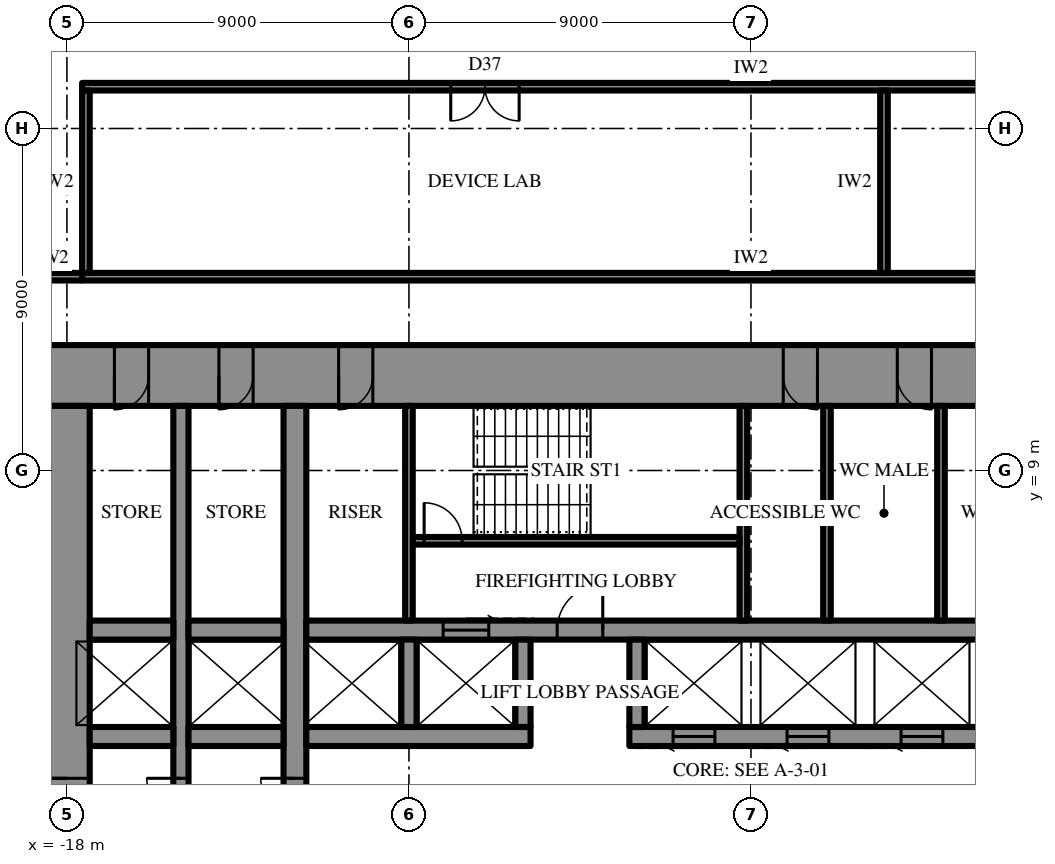
"""IFC4 building model, lengths in metres.
Left out: names, types, materials, properties, quantities, classifications, styles, units other than length and angle.
Written with IfcOpenShell. Run it as: python <this file> out.ifc"""

import sys

from ifc_helpers import new_model, si_unit, direction, frame, frame_2d, origin, place, context, subcontext, project, spatial, rectangle, extrude, element, fill, save


model = new_model("IFC4")
c1 = context("Model", 3, precision=1e-05, world=origin(), true_north=direction((0.0, 1.0)))
c2 = subcontext(c1, "Body", "Model", "MODEL_VIEW")
j1 = project(units=[si_unit("LENGTHUNIT", "METRE"), si_unit("PLANEANGLEUNIT", "RADIAN")], contexts=[c1])
p1 = place(None, origin())
s1 = spatial("IfcSite", under=j1, at=p1, CompositionType="ELEMENT")
p2 = place(p1, origin())
s2 = spatial("IfcBuilding", under=s1, at=p2, CompositionType="ELEMENT")
p3 = place(p2, frame((0.0, 0.0, 40.3)))
s3 = spatial("IfcBuildingStorey", under=s2, at=p3, CompositionType="ELEMENT", Elevation=40.3)
p4 = place(p3, frame((-18.6, 11.5, 0.0), z_axis=(0.0, 0.0, 1.0), x_axis=(1.0, 0.0, 0.0)))
e1 = element("IfcWall", 1, at=p4, inside=s3, PredefinedType="SHEAR", context=c2, shape_type="SweptSolid", body=[
    extrude(rectangle(XDim=37.2, YDim=1.6, at=frame_2d((18.6, 0.0))), origin(), (0.0, 0.0, 1.0), 4.2),
])
p5 = place(p4, frame((19.45, 0.0, 0.0)))
e2 = element("IfcOpeningElement", 2, at=p5, cuts=e1, PredefinedType="OPENING", context=c2, shape_type="SweptSolid", body=[
    extrude(rectangle(XDim=0.9, YDim=2.2, at=frame_2d((0.45, 1.1))), frame((0.0, 0.81, 0.0), z_axis=(0.0, -1.0, 0.0), x_axis=(1.0, 0.0, 0.0)), (0.0, 0.0, 1.0), 1.62),
])
p6 = place(p4, frame((22.45, 0.0, 0.0)))
e3 = element("IfcOpeningElement", 3, at=p6, cuts=e1, PredefinedType="OPENING", context=c2, shape_type="SweptSolid", body=[
    extrude(rectangle(XDim=0.9, YDim=2.2, at=frame_2d((0.45, 1.1))), frame((0.0, 0.81, 0.0), z_axis=(0.0, -1.0, 0.0), x_axis=(1.0, 0.0, 0.0)), (0.0, 0.0, 1.0), 1.62),
])
p7 = place(p4, frame((25.5, 0.0, 0.0)))
e4 = element("IfcOpeningElement", 4, at=p7, cuts=e1, PredefinedType="OPENING", context=c2, shape_type="SweptSolid", body=[
    extrude(rectangle(XDim=1.0, YDim=2.2, at=frame_2d((0.5, 1.1))), frame((0.0, 0.81, 0.0), z_axis=(0.0, -1.0, 0.0), x_axis=(1.0, 0.0, 0.0)), (0.0, 0.0, 1.0), 1.62),
])
p8 = place(p4, frame((1.85, 0.0, 0.0)))
e5 = element("IfcOpeningElement", 5, at=p8, cuts=e1, PredefinedType="OPENING", context=c2, shape_type="SweptSolid", body=[
    extrude(rectangle(XDim=0.9, YDim=2.2, at=frame_2d((0.45, 1.1))), frame((0.0, 0.81, 0.0), z_axis=(0.0, -1.0, 0.0), x_axis=(1.0, 0.0, 0.0)), (0.0, 0.0, 1.0), 1.62),
])
p9 = place(p4, frame((4.6, 0.0, 0.0)))
e6 = element("IfcOpeningElement", 6, at=p9, cuts=e1, PredefinedType="OPENING", context=c2, shape_type="SweptSolid", body=[
    extrude(rectangle(XDim=0.9, YDim=2.2, at=frame_2d((0.45, 1.1))), frame((0.0, 0.81, 0.0), z_axis=(0.0, -1.0, 0.0), x_axis=(1.0, 0.0, 0.0)), (0.0, 0.0, 1.0), 1.62),
])
p10 = place(p4, frame((7.75, 0.0, 0.0)))
e7 = element("IfcOpeningElement", 7, at=p10, cuts=e1, PredefinedType="OPENING", context=c2, shape_type="SweptSolid", body=[
    extrude(rectangle(XDim=0.9, YDim=2.2, at=frame_2d((0.45, 1.1))), frame((0.0, 0.81, 0.0), z_axis=(0.0, -1.0, 0.0), x_axis=(1.0, 0.0, 0.0)), (0.0, 0.0, 1.0), 1.62),
])
p11 = place(p4, frame((28.55, 0.0, 0.0)))
e8 = element("IfcOpeningElement", 8, at=p11, cuts=e1, PredefinedType="OPENING", context=c2, shape_type="SweptSolid", body=[
    extrude(rectangle(XDim=0.9, YDim=2.2, at=frame_2d((0.45, 1.1))), frame((0.0, 0.81, 0.0), z_axis=(0.0, -1.0, 0.0), x_axis=(1.0, 0.0, 0.0)), (0.0, 0.0, 1.0), 1.62),
])
p12 = place(p4, frame((31.7, 0.0, 0.0)))
e9 = element("IfcOpeningElement", 9, at=p12, cuts=e1, PredefinedType="OPENING", context=c2, shape_type="SweptSolid", body=[
    extrude(rectangle(XDim=0.9, YDim=2.2, at=frame_2d((0.45, 1.1))), frame((0.0, 0.81, 0.0), z_axis=(0.0, -1.0, 0.0), x_axis=(1.0, 0.0, 0.0)), (0.0, 0.0, 1.0), 1.62),
])
p13 = place(p4, frame((34.45, 0.0, 0.0)))
e10 = element("IfcOpeningElement", 10, at=p13, cuts=e1, PredefinedType="OPENING", context=c2, shape_type="SweptSolid", body=[
    extrude(rectangle(XDim=0.9, YDim=2.2, at=frame_2d((0.45, 1.1))), frame((0.0, 0.81, 0.0), z_axis=(0.0, -1.0, 0.0), x_axis=(1.0, 0.0, 0.0)), (0.0, 0.0, 1.0), 1.62),
])
p14 = place(p3, frame((-18.0, 10.7, 0.0), z_axis=(0.0, 0.0, 1.0), x_axis=(0.0, -1.0, 0.0)))
e11 = element("IfcWall", 11, at=p14, inside=s3, PredefinedType="SHEAR", context=c2, shape_type="SweptSolid", body=[
    extrude(rectangle(XDim=21.4, YDim=1.2, at=frame_2d((10.7, 0.0))), origin(), (0.0, 0.0, 1.0), 4.2),
])
p15 = place(p14, frame((9.8, 0.0, 0.0)))
e12 = element("IfcOpeningElement", 12, at=p15, cuts=e11, PredefinedType="OPENING", context=c2, shape_type="SweptSolid", body=[
    extrude(rectangle(XDim=1.8, YDim=2.4, at=frame_2d((0.9, 1.2))), frame((0.0, 0.61, 0.0), z_axis=(0.0, -1.0, 0.0), x_axis=(1.0, 0.0, 0.0)), (0.0, 0.0, 1.0), 1.22),
])
p16 = place(p3, frame((-12.0, -10.7, 0.0), z_axis=(0.0, 0.0, 1.0), x_axis=(0.0, 1.0, 0.0)))
e13 = element("IfcWall", 13, at=p16, inside=s3, PredefinedType="SHEAR", context=c2, shape_type="SweptSolid", body=[
    extrude(rectangle(XDim=21.4, YDim=0.6, at=frame_2d((10.7, 0.0))), origin(), (0.0, 0.0, 1.0), 4.2),
])
p17 = place(p16, frame((9.8, 0.0, 0.0)))
e14 = element("IfcOpeningElement", 14, at=p17, cuts=e13, PredefinedType="OPENING", context=c2, shape_type="SweptSolid", body=[
    extrude(rectangle(XDim=1.8, YDim=2.4, at=frame_2d((0.9, 1.2))), frame((0.0, 0.31, 0.0), z_axis=(0.0, -1.0, 0.0), x_axis=(1.0, 0.0, 0.0)), (0.0, 0.0, 1.0), 0.62),
])
p18 = place(p3, frame((-15.0, -10.7, 0.0), z_axis=(0.0, 0.0, 1.0), x_axis=(0.0, 1.0, 0.0)))
e15 = element("IfcWall", 15, at=p18, inside=s3, PredefinedType="SHEAR", context=c2, shape_type="SweptSolid", body=[
    extrude(rectangle(XDim=21.4, YDim=0.4, at=frame_2d((10.7, 0.0))), origin(), (0.0, 0.0, 1.0), 4.2),
])
p19 = place(p18, frame((9.8, 0.0, 0.0)))
e16 = element("IfcOpeningElement", 16, at=p19, cuts=e15, PredefinedType="OPENING", context=c2, shape_type="SweptSolid", body=[
    extrude(rectangle(XDim=1.8, YDim=2.4, at=frame_2d((0.9, 1.2))), frame((0.0, 0.21, 0.0), z_axis=(0.0, -1.0, 0.0), x_axis=(1.0, 0.0, 0.0)), (0.0, 0.0, 1.0), 0.42),
])
p20 = place(p3, frame((-17.4, 2.0, 0.0), z_axis=(0.0, 0.0, 1.0), x_axis=(1.0, 0.0, 0.0)))
e17 = element("IfcWall", 17, at=p20, inside=s3, PredefinedType="SHEAR", context=c2, shape_type="SweptSolid", body=[
    extrude(rectangle(XDim=2.2, YDim=0.5, at=frame_2d((1.1, 0.0))), origin(), (0.0, 0.0, 1.0), 4.2),
])
p21 = place(p3, frame((-14.8, 2.0, 0.0), z_axis=(0.0, 0.0, 1.0), x_axis=(1.0, 0.0, 0.0)))
e18 = element("IfcWall", 18, at=p21, inside=s3, PredefinedType="SHEAR", context=c2, shape_type="SweptSolid", body=[
    extrude(rectangle(XDim=2.5, YDim=0.5, at=frame_2d((1.25, 0.0))), origin(), (0.0, 0.0, 1.0), 4.2),
])
p22 = place(p3, frame((-11.7, 2.0, 0.0), z_axis=(0.0, 0.0, 1.0), x_axis=(1.0, 0.0, 0.0)))
e19 = element("IfcWall", 19, at=p22, inside=s3, PredefinedType="SHEAR", context=c2, shape_type="SweptSolid", body=[
    extrude(rectangle(XDim=5.9, YDim=0.5, at=frame_2d((2.95, 0.0))), origin(), (0.0, 0.0, 1.0), 4.2),
])
p23 = place(p3, frame((-3.2, 2.0, 0.0), z_axis=(0.0, 0.0, 1.0), x_axis=(1.0, 0.0, 0.0)))
e20 = element("IfcWall", 20, at=p23, inside=s3, PredefinedType="SHEAR", context=c2, shape_type="SweptSolid", body=[
    extrude(rectangle(XDim=14.9, YDim=0.5, at=frame_2d((7.45, 0.0))), origin(), (0.0, 0.0, 1.0), 4.2),
])
p24 = place(p23, frame((1.15, 0.0, 0.0)))
e21 = element("IfcOpeningElement", 21, at=p24, cuts=e20, PredefinedType="OPENING", context=c2, shape_type="SweptSolid", body=[
    extrude(rectangle(XDim=1.1, YDim=2.2, at=frame_2d((0.55, 1.1))), frame((0.0, 0.26, 0.0), z_axis=(0.0, -1.0, 0.0), x_axis=(1.0, 0.0, 0.0)), (0.0, 0.0, 1.0), 0.52),
])
p25 = place(p23, frame((4.15, 0.0, 0.0)))
e22 = element("IfcOpeningElement", 22, at=p25, cuts=e20, PredefinedType="OPENING", context=c2, shape_type="SweptSolid", body=[
    extrude(rectangle(XDim=1.1, YDim=2.2, at=frame_2d((0.55, 1.1))), frame((0.0, 0.26, 0.0), z_axis=(0.0, -1.0, 0.0), x_axis=(1.0, 0.0, 0.0)), (0.0, 0.0, 1.0), 0.52),
])
p26 = place(p23, frame((7.15, 0.0, 0.0)))
e23 = element("IfcOpeningElement", 23, at=p26, cuts=e20, PredefinedType="OPENING", context=c2, shape_type="SweptSolid", body=[
    extrude(rectangle(XDim=1.1, YDim=2.2, at=frame_2d((0.55, 1.1))), frame((0.0, 0.26, 0.0), z_axis=(0.0, -1.0, 0.0), x_axis=(1.0, 0.0, 0.0)), (0.0, 0.0, 1.0), 0.52),
])
p27 = place(p23, frame((10.15, 0.0, 0.0)))
e24 = element("IfcOpeningElement", 24, at=p27, cuts=e20, PredefinedType="OPENING", context=c2, shape_type="SweptSolid", body=[
    extrude(rectangle(XDim=1.1, YDim=2.2, at=frame_2d((0.55, 1.1))), frame((0.0, 0.26, 0.0), z_axis=(0.0, -1.0, 0.0), x_axis=(1.0, 0.0, 0.0)), (0.0, 0.0, 1.0), 0.52),
])
p28 = place(p3, frame((-17.4, 4.8, 0.0), z_axis=(0.0, 0.0, 1.0), x_axis=(1.0, 0.0, 0.0)))
e25 = element("IfcWall", 25, at=p28, inside=s3, PredefinedType="SHEAR", context=c2, shape_type="SweptSolid", body=[
    extrude(rectangle(XDim=2.2, YDim=0.5, at=frame_2d((1.1, 0.0))), origin(), (0.0, 0.0, 1.0), 4.2),
])
p29 = place(p3, frame((-14.8, 4.8, 0.0), z_axis=(0.0, 0.0, 1.0), x_axis=(1.0, 0.0, 0.0)))
e26 = element("IfcWall", 26, at=p29, inside=s3, PredefinedType="SHEAR", context=c2, shape_type="SweptSolid", body=[
    extrude(rectangle(XDim=2.5, YDim=0.5, at=frame_2d((1.25, 0.0))), origin(), (0.0, 0.0, 1.0), 4.2),
])
p30 = place(p3, frame((-11.7, 4.8, 0.0), z_axis=(0.0, 0.0, 1.0), x_axis=(1.0, 0.0, 0.0)))
e27 = element("IfcWall", 27, at=p30, inside=s3, PredefinedType="SHEAR", context=c2, shape_type="SweptSolid", body=[
    extrude(rectangle(XDim=23.4, YDim=0.5, at=frame_2d((11.7, 0.0))), origin(), (0.0, 0.0, 1.0), 4.2),
])
p31 = place(p30, frame((6.6, 0.0, 0.0)))
e28 = element("IfcOpeningElement", 28, at=p31, cuts=e27, PredefinedType="OPENING", context=c2, shape_type="SweptSolid", body=[
    extrude(rectangle(XDim=1.2, YDim=2.2, at=frame_2d((0.6, 1.1))), frame((0.0, 0.26, 0.0), z_axis=(0.0, -1.0, 0.0), x_axis=(1.0, 0.0, 0.0)), (0.0, 0.0, 1.0), 0.52),
])
p32 = place(p30, frame((3.6, 0.0, 0.0)))
e29 = element("IfcOpeningElement", 29, at=p32, cuts=e27, PredefinedType="OPENING", context=c2, shape_type="SweptSolid", body=[
    extrude(rectangle(XDim=1.2, YDim=2.2, at=frame_2d((0.6, 1.1))), frame((0.0, 0.26, 0.0), z_axis=(0.0, -1.0, 0.0), x_axis=(1.0, 0.0, 0.0)), (0.0, 0.0, 1.0), 0.52),
])
for number, where, z_axis, x_axis in (
    (30, (-9.0, 2.25, 0.0), (0.0, 0.0, 1.0), (0.0, 1.0, 0.0)),
    (31, (-6.0, 2.25, 0.0), (0.0, 0.0, 1.0), (0.0, 1.0, 0.0)),
    (32, (-3.0, 2.25, 0.0), (0.0, 0.0, 1.0), (0.0, 1.0, 0.0)),
):
    element("IfcWall", number, at=place(p3, frame(where, z_axis=z_axis, x_axis=x_axis)), inside=s3, PredefinedType="SHEAR", context=c2, shape_type="SweptSolid", body=[
        extrude(rectangle(XDim=2.3, YDim=0.4, at=frame_2d((1.15, 0.0))), origin(), (0.0, 0.0, 1.0), 4.2),
    ])
p33 = place(p3, frame((-0.2, 5.05, 0.0), z_axis=(0.0, 0.0, 1.0), x_axis=(0.0, 1.0, 0.0)))
e33 = element("IfcWall", 33, at=p33, inside=s3, PredefinedType="SHEAR", context=c2, shape_type="SweptSolid", body=[
    extrude(rectangle(XDim=5.65, YDim=0.2, at=frame_2d((2.825, 0.0))), origin(), (0.0, 0.0, 1.0), 4.2),
])
p34 = place(p3, frame((-8.9, 7.15, 0.0), z_axis=(0.0, 0.0, 1.0), x_axis=(1.0, 0.0, 0.0)))
e34 = element("IfcWall", 34, at=p34, inside=s3, PredefinedType="SHEAR", context=c2, shape_type="SweptSolid", body=[
    extrude(rectangle(XDim=8.6, YDim=0.2, at=frame_2d((4.3, 0.0))), origin(), (0.0, 0.0, 1.0), 4.2),
])
p35 = place(p34, frame((0.3, 0.0, 0.0)))
e35 = element("IfcOpeningElement", 35, at=p35, cuts=e34, PredefinedType="OPENING", context=c2, shape_type="SweptSolid", body=[
    extrude(rectangle(XDim=1.0, YDim=2.2, at=frame_2d((0.5, 1.1))), frame((0.0, 0.11, 0.0), z_axis=(0.0, -1.0, 0.0), x_axis=(1.0, 0.0, 0.0)), (0.0, 0.0, 1.0), 0.22),
])
for number, where, z_axis, x_axis in (
    (36, (-9.0, 5.05, 0.0), (0.0, 0.0, 1.0), (0.0, 1.0, 0.0)),
    (37, (2.0, 5.05, 0.0), (0.0, 0.0, 1.0), (0.0, 1.0, 0.0)),
    (38, (5.0, 5.05, 0.0), (0.0, 0.0, 1.0), (0.0, 1.0, 0.0)),
):
    element("IfcWall", number, at=place(p3, frame(where, z_axis=z_axis, x_axis=x_axis)), inside=s3, PredefinedType="PARTITIONING", context=c2, shape_type="SweptSolid", body=[
        extrude(rectangle(XDim=5.65, YDim=0.2, at=frame_2d((2.825, 0.0))), origin(), (0.0, 0.0, 1.0), 4.0),
    ])
p36 = place(p3, frame((-17.6, 14.1, 0.0), z_axis=(0.0, 0.0, 1.0), x_axis=(1.0, 0.0, 0.0)))
e39 = element("IfcWall", 39, at=p36, inside=s3, PredefinedType="PARTITIONING", context=c2, shape_type="SweptSolid", body=[
    extrude(rectangle(XDim=35.2, YDim=0.2, at=frame_2d((17.6, 0.0))), origin(), (0.0, 0.0, 1.0), 4.0),
])
p37 = place(p3, frame((-17.6, 19.1, 0.0), z_axis=(0.0, 0.0, 1.0), x_axis=(1.0, 0.0, 0.0)))
e40 = element("IfcWall", 40, at=p37, inside=s3, PredefinedType="PARTITIONING", context=c2, shape_type="SweptSolid", body=[
    extrude(rectangle(XDim=35.2, YDim=0.2, at=frame_2d((17.6, 0.0))), origin(), (0.0, 0.0, 1.0), 4.0),
])
p38 = place(p37, frame((9.7, 0.0, 0.0)))
e41 = element("IfcOpeningElement", 41, at=p38, cuts=e40, PredefinedType="OPENING", context=c2, shape_type="SweptSolid", body=[
    extrude(rectangle(XDim=1.8, YDim=2.4, at=frame_2d((0.9, 1.2))), frame((0.0, 0.11, 0.0), z_axis=(0.0, -1.0, 0.0), x_axis=(1.0, 0.0, 0.0)), (0.0, 0.0, 1.0), 0.22),
])
p39 = place(p37, frame((27.2, 0.0, 0.0)))
e42 = element("IfcOpeningElement", 42, at=p39, cuts=e40, PredefinedType="OPENING", context=c2, shape_type="SweptSolid", body=[
    extrude(rectangle(XDim=1.8, YDim=2.4, at=frame_2d((0.9, 1.2))), frame((0.0, 0.11, 0.0), z_axis=(0.0, -1.0, 0.0), x_axis=(1.0, 0.0, 0.0)), (0.0, 0.0, 1.0), 0.22),
])
for number, where, z_axis, x_axis in (
    (43, (-17.5, 14.2, 0.0), (0.0, 0.0, 1.0), (0.0, 1.0, 0.0)),
    (44, (3.5, 14.2, 0.0), (0.0, 0.0, 1.0), (0.0, 1.0, 0.0)),
):
    element("IfcWall", number, at=place(p3, frame(where, z_axis=z_axis, x_axis=x_axis)), inside=s3, PredefinedType="PARTITIONING", context=c2, shape_type="SweptSolid", body=[
        extrude(rectangle(XDim=4.8, YDim=0.2, at=frame_2d((2.4, 0.0))), origin(), (0.0, 0.0, 1.0), 4.0),
    ])
p40 = place(p3, frame((-19.2, 14.1, 0.0), z_axis=(0.0, 0.0, 1.0), x_axis=(1.0, 0.0, 0.0)))
e45 = element("IfcWall", 45, at=p40, inside=s3, PredefinedType="PARTITIONING", context=c2, shape_type="SweptSolid", body=[
    extrude(rectangle(XDim=1.6, YDim=0.2, at=frame_2d((0.8, 0.0))), origin(), (0.0, 0.0, 1.0), 4.0),
])
p41 = place(p15, frame((1.8, 0.0, 0.0), z_axis=(0.0, 0.0, 1.0), x_axis=(-1.0, 0.0, 0.0)))
e46 = element("IfcDoor", 46, at=p41, inside=s3, OperationType="DOUBLE_DOOR_SINGLE_SWING", PredefinedType="DOOR", context=c2, shape_type="SweptSolid", body=[
    extrude(rectangle(XDim=1.8, YDim=2.4, at=frame_2d((0.9, 1.2))), frame((0.0, 0.025, 0.0), z_axis=(0.0, -1.0, 0.0), x_axis=(1.0, 0.0, 0.0)), (0.0, 0.0, 1.0), 0.05),
])
fill(e12, e46)
p42 = place(p31, origin())
e47 = element("IfcDoor", 47, at=p42, inside=s3, OperationType="SINGLE_SWING_LEFT", PredefinedType="DOOR", context=c2, shape_type="SweptSolid", body=[
    extrude(rectangle(XDim=1.2, YDim=2.2, at=frame_2d((0.6, 1.1))), frame((0.0, 0.025, 0.0), z_axis=(0.0, -1.0, 0.0), x_axis=(1.0, 0.0, 0.0)), (0.0, 0.0, 1.0), 0.05),
])
fill(e28, e47)
p43 = place(p35, origin())
e48 = element("IfcDoor", 48, at=p43, inside=s3, OperationType="SINGLE_SWING_RIGHT", PredefinedType="DOOR", context=c2, shape_type="SweptSolid", body=[
    extrude(rectangle(XDim=1.0, YDim=2.2, at=frame_2d((0.5, 1.1))), frame((0.0, 0.025, 0.0), z_axis=(0.0, -1.0, 0.0), x_axis=(1.0, 0.0, 0.0)), (0.0, 0.0, 1.0), 0.05),
])
fill(e35, e48)
p44 = place(p5, frame((0.9, 0.0, 0.0), z_axis=(0.0, 0.0, 1.0), x_axis=(-1.0, 0.0, 0.0)))
e49 = element("IfcDoor", 49, at=p44, inside=s3, OperationType="SINGLE_SWING_RIGHT", PredefinedType="DOOR", context=c2, shape_type="SweptSolid", body=[
    extrude(rectangle(XDim=0.9, YDim=2.2, at=frame_2d((0.45, 1.1))), frame((0.0, 0.025, 0.0), z_axis=(0.0, -1.0, 0.0), x_axis=(1.0, 0.0, 0.0)), (0.0, 0.0, 1.0), 0.05),
])
fill(e2, e49)
p45 = place(p6, frame((0.9, 0.0, 0.0), z_axis=(0.0, 0.0, 1.0), x_axis=(-1.0, 0.0, 0.0)))
e50 = element("IfcDoor", 50, at=p45, inside=s3, OperationType="SINGLE_SWING_RIGHT", PredefinedType="DOOR", context=c2, shape_type="SweptSolid", body=[
    extrude(rectangle(XDim=0.9, YDim=2.2, at=frame_2d((0.45, 1.1))), frame((0.0, 0.025, 0.0), z_axis=(0.0, -1.0, 0.0), x_axis=(1.0, 0.0, 0.0)), (0.0, 0.0, 1.0), 0.05),
])
fill(e3, e50)
p46 = place(p8, frame((0.9, 0.0, 0.0), z_axis=(0.0, 0.0, 1.0), x_axis=(-1.0, 0.0, 0.0)))
e51 = element("IfcDoor", 51, at=p46, inside=s3, OperationType="SINGLE_SWING_LEFT", PredefinedType="DOOR", context=c2, shape_type="SweptSolid", body=[
    extrude(rectangle(XDim=0.9, YDim=2.2, at=frame_2d((0.45, 1.1))), frame((0.0, 0.025, 0.0), z_axis=(0.0, -1.0, 0.0), x_axis=(1.0, 0.0, 0.0)), (0.0, 0.0, 1.0), 0.05),
])
fill(e5, e51)
p47 = place(p9, frame((0.9, 0.0, 0.0), z_axis=(0.0, 0.0, 1.0), x_axis=(-1.0, 0.0, 0.0)))
e52 = element("IfcDoor", 52, at=p47, inside=s3, OperationType="SINGLE_SWING_LEFT", PredefinedType="DOOR", context=c2, shape_type="SweptSolid", body=[
    extrude(rectangle(XDim=0.9, YDim=2.2, at=frame_2d((0.45, 1.1))), frame((0.0, 0.025, 0.0), z_axis=(0.0, -1.0, 0.0), x_axis=(1.0, 0.0, 0.0)), (0.0, 0.0, 1.0), 0.05),
])
fill(e6, e52)
p48 = place(p10, frame((0.9, 0.0, 0.0), z_axis=(0.0, 0.0, 1.0), x_axis=(-1.0, 0.0, 0.0)))
e53 = element("IfcDoor", 53, at=p48, inside=s3, OperationType="SINGLE_SWING_LEFT", PredefinedType="DOOR", context=c2, shape_type="SweptSolid", body=[
    extrude(rectangle(XDim=0.9, YDim=2.2, at=frame_2d((0.45, 1.1))), frame((0.0, 0.025, 0.0), z_axis=(0.0, -1.0, 0.0), x_axis=(1.0, 0.0, 0.0)), (0.0, 0.0, 1.0), 0.05),
])
fill(e7, e53)
p49 = place(p17, origin())
e54 = element("IfcDoor", 54, at=p49, inside=s3, OperationType="DOUBLE_DOOR_SINGLE_SWING", PredefinedType="DOOR", context=c2, shape_type="SweptSolid", body=[
    extrude(rectangle(XDim=1.8, YDim=2.4, at=frame_2d((0.9, 1.2))), frame((0.0, 0.025, 0.0), z_axis=(0.0, -1.0, 0.0), x_axis=(1.0, 0.0, 0.0)), (0.0, 0.0, 1.0), 0.05),
])
fill(e14, e54)
p50 = place(p19, origin())
e55 = element("IfcDoor", 55, at=p50, inside=s3, OperationType="DOUBLE_DOOR_SINGLE_SWING", PredefinedType="DOOR", context=c2, shape_type="SweptSolid", body=[
    extrude(rectangle(XDim=1.8, YDim=2.4, at=frame_2d((0.9, 1.2))), frame((0.0, 0.025, 0.0), z_axis=(0.0, -1.0, 0.0), x_axis=(1.0, 0.0, 0.0)), (0.0, 0.0, 1.0), 0.05),
])
fill(e16, e55)
p51 = place(p32, origin())
e56 = element("IfcDoor", 56, at=p51, inside=s3, OperationType="SLIDING_TO_LEFT", PredefinedType="DOOR", context=c2, shape_type="SweptSolid", body=[
    extrude(rectangle(XDim=1.2, YDim=2.2, at=frame_2d((0.6, 1.1))), frame((0.0, 0.025, 0.0), z_axis=(0.0, -1.0, 0.0), x_axis=(1.0, 0.0, 0.0)), (0.0, 0.0, 1.0), 0.05),
])
fill(e29, e56)
p52 = place(p24, frame((1.1, 0.0, 0.0), z_axis=(0.0, 0.0, 1.0), x_axis=(-1.0, 0.0, 0.0)))
e57 = element("IfcDoor", 57, at=p52, inside=s3, OperationType="SLIDING_TO_LEFT", PredefinedType="DOOR", context=c2, shape_type="SweptSolid", body=[
    extrude(rectangle(XDim=1.1, YDim=2.2, at=frame_2d((0.55, 1.1))), frame((0.0, 0.025, 0.0), z_axis=(0.0, -1.0, 0.0), x_axis=(1.0, 0.0, 0.0)), (0.0, 0.0, 1.0), 0.05),
])
fill(e21, e57)
p53 = place(p25, frame((1.1, 0.0, 0.0), z_axis=(0.0, 0.0, 1.0), x_axis=(-1.0, 0.0, 0.0)))
e58 = element("IfcDoor", 58, at=p53, inside=s3, OperationType="SLIDING_TO_LEFT", PredefinedType="DOOR", context=c2, shape_type="SweptSolid", body=[
    extrude(rectangle(XDim=1.1, YDim=2.2, at=frame_2d((0.55, 1.1))), frame((0.0, 0.025, 0.0), z_axis=(0.0, -1.0, 0.0), x_axis=(1.0, 0.0, 0.0)), (0.0, 0.0, 1.0), 0.05),
])
fill(e22, e58)
p54 = place(p26, frame((1.1, 0.0, 0.0), z_axis=(0.0, 0.0, 1.0), x_axis=(-1.0, 0.0, 0.0)))
e59 = element("IfcDoor", 59, at=p54, inside=s3, OperationType="SLIDING_TO_LEFT", PredefinedType="DOOR", context=c2, shape_type="SweptSolid", body=[
    extrude(rectangle(XDim=1.1, YDim=2.2, at=frame_2d((0.55, 1.1))), frame((0.0, 0.025, 0.0), z_axis=(0.0, -1.0, 0.0), x_axis=(1.0, 0.0, 0.0)), (0.0, 0.0, 1.0), 0.05),
])
fill(e23, e59)
p55 = place(p38, frame((1.8, 0.0, 0.0), z_axis=(0.0, 0.0, 1.0), x_axis=(-1.0, 0.0, 0.0)))
e60 = element("IfcDoor", 60, at=p55, inside=s3, OperationType="DOUBLE_DOOR_SINGLE_SWING", PredefinedType="DOOR", context=c2, shape_type="SweptSolid", body=[
    extrude(rectangle(XDim=1.8, YDim=2.4, at=frame_2d((0.9, 1.2))), frame((0.0, 0.025, 0.0), z_axis=(0.0, -1.0, 0.0), x_axis=(1.0, 0.0, 0.0)), (0.0, 0.0, 1.0), 0.05),
])
fill(e41, e60)
save(model, sys.argv[1])
